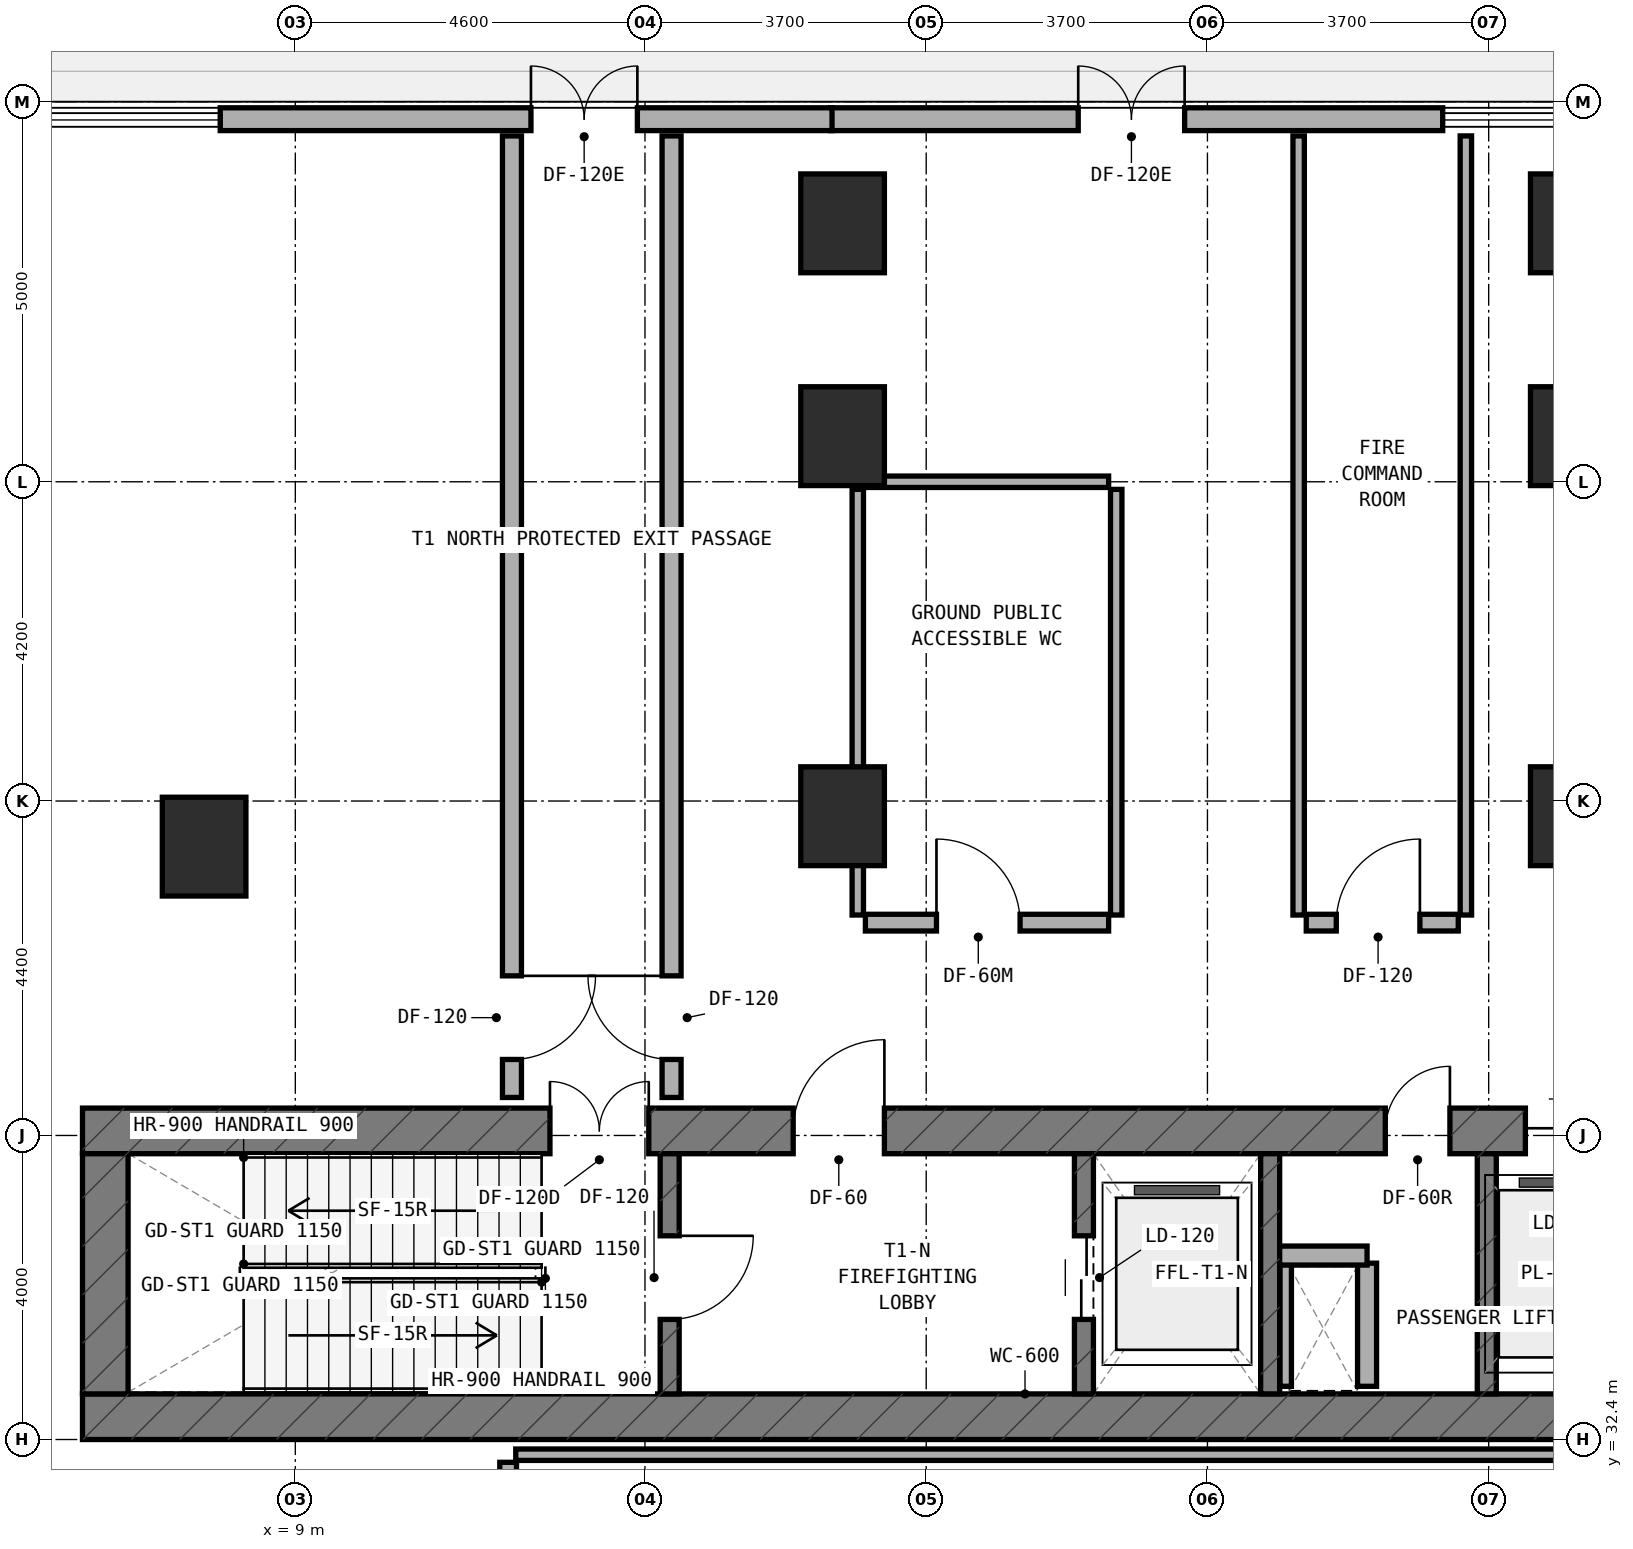
"""IFC4 building model, lengths in metres.
Left out: names, types, materials, properties, quantities, classifications, styles, units other than length and angle.
Written with IfcOpenShell. Run it as: python <this file> out.ifc"""

import sys

from ifc_helpers import new_model, si_unit, direction, frame, frame_2d, origin, origin_2d, place, context, subcontext, project, spatial, rectangle, extrude, element, fill, save


model = new_model("IFC4")
c1 = context("Model", 3, precision=1e-05, world=origin(), true_north=direction((0.0, 1.0)))
c2 = subcontext(c1, "Body", "Model", "MODEL_VIEW")
j1 = project(units=[si_unit("LENGTHUNIT", "METRE"), si_unit("PLANEANGLEUNIT", "RADIAN")], contexts=[c1])
p1 = place(None, origin())
s1 = spatial("IfcSite", under=j1, at=p1, CompositionType="ELEMENT")
p2 = place(p1, origin())
s2 = spatial("IfcBuilding", under=s1, at=p2, CompositionType="ELEMENT")
p3 = place(p2, origin())
s3 = spatial("IfcBuildingStorey", under=s2, at=p3, CompositionType="ELEMENT", Elevation=0.0)
p4 = place(p3, frame((6.2, 32.7, 0.0), z_axis=(0.0, 0.0, 1.0), x_axis=(1.0, 0.0, 0.0)))
e1 = element("IfcWall", 1, at=p4, inside=s3, PredefinedType="SHEAR", context=c2, shape_type="SweptSolid", body=[
    extrude(rectangle(XDim=24.8, YDim=0.6, at=frame_2d((12.4, 0.0))), origin(), (0.0, 0.0, 1.0), 5.4),
])
p5 = place(p3, frame((6.2, 36.46, 0.0), z_axis=(0.0, 0.0, 1.0), x_axis=(1.0, 0.0, 0.0)))
e2 = element("IfcWall", 2, at=p5, inside=s3, PredefinedType="SHEAR", context=c2, shape_type="SweptSolid", body=[
    extrude(rectangle(XDim=24.8, YDim=0.6, at=frame_2d((12.4, 0.0))), origin(), (0.0, 0.0, 1.0), 5.4),
])
p6 = place(p5, frame((9.35, 0.0, 0.0)))
e3 = element("IfcOpeningElement", 3, at=p6, cuts=e2, PredefinedType="OPENING", context=c2, shape_type="SweptSolid", body=[
    extrude(rectangle(XDim=1.2, YDim=2.15, at=frame_2d((0.6, 1.075))), frame((0.0, 0.31, 0.0), z_axis=(0.0, -1.0, 0.0), x_axis=(1.0, 0.0, 0.0)), (0.0, 0.0, 1.0), 0.62),
])
p7 = place(p5, frame((6.15, 0.0, 0.0)))
e4 = element("IfcOpeningElement", 4, at=p7, cuts=e2, PredefinedType="OPENING", context=c2, shape_type="SweptSolid", body=[
    extrude(rectangle(XDim=1.3, YDim=2.15, at=frame_2d((0.65, 1.075))), frame((0.0, 0.31, 0.0), z_axis=(0.0, -1.0, 0.0), x_axis=(1.0, 0.0, 0.0)), (0.0, 0.0, 1.0), 0.62),
])
p8 = place(p5, frame((17.14, 0.0, 0.0)))
e5 = element("IfcOpeningElement", 5, at=p8, cuts=e2, PredefinedType="OPENING", context=c2, shape_type="SweptSolid", body=[
    extrude(rectangle(XDim=0.85, YDim=2.1, at=frame_2d((0.425, 1.05))), frame((0.0, 0.31, 0.0), z_axis=(0.0, -1.0, 0.0), x_axis=(1.0, 0.0, 0.0)), (0.0, 0.0, 1.0), 0.62),
])
p9 = place(p5, frame((18.983, 0.0, 0.0)))
e6 = element("IfcOpeningElement", 6, at=p9, cuts=e2, PredefinedType="OPENING", context=c2, shape_type="SweptSolid", body=[
    extrude(rectangle(XDim=1.1, YDim=2.15, at=frame_2d((0.55, 1.075))), frame((0.0, 0.31, 0.0), z_axis=(0.0, -1.0, 0.0), x_axis=(1.0, 0.0, 0.0)), (0.0, 0.0, 1.0), 0.62),
])
p10 = place(p5, frame((20.85, 0.0, 0.0)))
e7 = element("IfcOpeningElement", 7, at=p10, cuts=e2, PredefinedType="OPENING", context=c2, shape_type="SweptSolid", body=[
    extrude(rectangle(XDim=1.1, YDim=2.15, at=frame_2d((0.55, 1.075))), frame((0.0, 0.31, 0.0), z_axis=(0.0, -1.0, 0.0), x_axis=(1.0, 0.0, 0.0)), (0.0, 0.0, 1.0), 0.62),
])
p11 = place(p5, frame((22.716, 0.0, 0.0)))
e8 = element("IfcOpeningElement", 8, at=p11, cuts=e2, PredefinedType="OPENING", context=c2, shape_type="SweptSolid", body=[
    extrude(rectangle(XDim=1.1, YDim=2.15, at=frame_2d((0.55, 1.075))), frame((0.0, 0.31, 0.0), z_axis=(0.0, -1.0, 0.0), x_axis=(1.0, 0.0, 0.0)), (0.0, 0.0, 1.0), 0.62),
])
p12 = place(p3, frame((6.5, 33.0, 0.0), z_axis=(0.0, 0.0, 1.0), x_axis=(0.0, 1.0, 0.0)))
e9 = element("IfcWall", 9, at=p12, inside=s3, PredefinedType="SHEAR", context=c2, shape_type="SweptSolid", body=[
    extrude(rectangle(XDim=3.16, YDim=0.6, at=frame_2d((1.58, 0.0))), origin(), (0.0, 0.0, 1.0), 5.4),
])
p13 = place(p3, frame((13.925, 33.0, 0.0), z_axis=(0.0, 0.0, 1.0), x_axis=(0.0, 1.0, 0.0)))
e10 = element("IfcWall", 10, at=p13, inside=s3, PredefinedType="STANDARD", context=c2, shape_type="SweptSolid", body=[
    extrude(rectangle(XDim=3.16, YDim=0.25, at=frame_2d((1.58, 0.0))), origin(), (0.0, 0.0, 1.0), 5.05),
])
p14 = place(p13, frame((0.98, 0.0, 0.0)))
e11 = element("IfcOpeningElement", 11, at=p14, cuts=e10, PredefinedType="OPENING", context=c2, shape_type="SweptSolid", body=[
    extrude(rectangle(XDim=1.1, YDim=2.15, at=frame_2d((0.55, 1.075))), frame((0.0, 0.135, 0.0), z_axis=(0.0, -1.0, 0.0), x_axis=(1.0, 0.0, 0.0)), (0.0, 0.0, 1.0), 0.27),
])
p15 = place(p3, frame((19.375, 33.0, 0.0), z_axis=(0.0, 0.0, 1.0), x_axis=(0.0, 1.0, 0.0)))
e12 = element("IfcWall", 12, at=p15, inside=s3, PredefinedType="STANDARD", context=c2, shape_type="SweptSolid", body=[
    extrude(rectangle(XDim=3.16, YDim=0.25, at=frame_2d((1.58, 0.0))), origin(), (0.0, 0.0, 1.0), 5.05),
])
p16 = place(p15, frame((0.98, 0.0, 0.0)))
e13 = element("IfcOpeningElement", 13, at=p16, cuts=e12, PredefinedType="OPENING", context=c2, shape_type="SweptSolid", body=[
    extrude(rectangle(XDim=1.1, YDim=2.15, at=frame_2d((0.55, 1.075))), frame((0.0, 0.135, 0.0), z_axis=(0.0, -1.0, 0.0), x_axis=(1.0, 0.0, 0.0)), (0.0, 0.0, 1.0), 0.27),
])
for number, where, z_axis, x_axis in (
    (14, (21.825, 33.0, 0.0), (0.0, 0.0, 1.0), (0.0, 1.0, 0.0)),
    (15, (24.675, 33.0, 0.0), (0.0, 0.0, 1.0), (0.0, 1.0, 0.0)),
):
    element("IfcWall", number, at=place(p3, frame(where, z_axis=z_axis, x_axis=x_axis)), inside=s3, PredefinedType="STANDARD", context=c2, shape_type="SweptSolid", body=[
        extrude(rectangle(XDim=3.16, YDim=0.25, at=frame_2d((1.58, 0.0))), origin(), (0.0, 0.0, 1.0), 5.05),
    ])
for number, where, z_axis, x_axis in (
    (16, (16.2, 40.6, 0.0), (0.0, 0.0, 1.0), (1.0, 0.0, 0.0)),
    (17, (25.8, 40.6, 0.0), (0.0, 0.0, 1.0), (1.0, 0.0, 0.0)),
    (18, (7.8, 40.2, 0.0), (0.0, 0.0, 1.0), (1.0, 0.0, 0.0)),
    (19, (16.2, 48.4, 0.0), (0.0, 0.0, 1.0), (1.0, 0.0, 0.0)),
    (20, (25.8, 48.4, 0.0), (0.0, 0.0, 1.0), (1.0, 0.0, 0.0)),
    (21, (16.2, 45.6, 0.0), (0.0, 0.0, 1.0), (1.0, 0.0, 0.0)),
    (22, (25.8, 45.6, 0.0), (0.0, 0.0, 1.0), (1.0, 0.0, 0.0)),
):
    element("IfcColumn", number, at=place(p3, frame(where, z_axis=z_axis, x_axis=x_axis)), inside=s3, PredefinedType="COLUMN", context=c2, shape_type="SweptSolid", body=[
        extrude(rectangle(XDim=1.1, YDim=1.3, at=origin_2d()), origin(), (0.0, 0.0, 1.0), 5.4),
    ])
p17 = place(p3, frame((24.095, 49.77, 0.0), z_axis=(0.0, 0.0, 1.0), x_axis=(-1.0, 0.0, 0.0)))
e23 = element("IfcWall", 23, at=p17, inside=s3, PredefinedType="STANDARD", context=c2, shape_type="SweptSolid", body=[
    extrude(rectangle(XDim=8.05, YDim=0.3, at=frame_2d((4.025, 0.0))), origin(), (0.0, 0.0, 1.0), 5.05),
])
p18 = place(p17, frame((3.395, 0.0, 0.0)))
e24 = element("IfcOpeningElement", 24, at=p18, cuts=e23, PredefinedType="OPENING", context=c2, shape_type="SweptSolid", body=[
    extrude(rectangle(XDim=1.4, YDim=2.2, at=frame_2d((0.7, 1.1))), frame((0.0, 0.16, 0.0), z_axis=(0.0, -1.0, 0.0), x_axis=(1.0, 0.0, 0.0)), (0.0, 0.0, 1.0), 0.32),
])
p19 = place(p3, frame((16.061, 49.77, 0.0), z_axis=(0.0, 0.0, 1.0), x_axis=(-1.0, 0.0, 0.0)))
e25 = element("IfcWall", 25, at=p19, inside=s3, PredefinedType="STANDARD", context=c2, shape_type="SweptSolid", body=[
    extrude(rectangle(XDim=8.049, YDim=0.3, at=frame_2d((4.024, 0.0))), origin(), (0.0, 0.0, 1.0), 5.05),
])
p20 = place(p19, frame((2.561, 0.0, 0.0)))
e26 = element("IfcOpeningElement", 26, at=p20, cuts=e25, PredefinedType="OPENING", context=c2, shape_type="SweptSolid", body=[
    extrude(rectangle(XDim=1.4, YDim=2.2, at=frame_2d((0.7, 1.1))), frame((0.0, 0.16, 0.0), z_axis=(0.0, -1.0, 0.0), x_axis=(1.0, 0.0, 0.0)), (0.0, 0.0, 1.0), 0.32),
])
p21 = place(p3, frame((22.03, 33.1, 0.0), z_axis=(0.0, 0.0, 1.0), x_axis=(0.0, 1.0, 0.0)))
e27 = element("IfcWall", 27, at=p21, inside=s3, PredefinedType="PARTITIONING", context=c2, shape_type="SweptSolid", body=[
    extrude(rectangle(XDim=1.62, YDim=0.15, at=frame_2d((0.81, 0.0))), origin(), (0.0, 0.0, 1.0), 5.05),
])
p22 = place(p3, frame((23.1, 33.1, 0.0), z_axis=(0.0, 0.0, 1.0), x_axis=(0.0, 1.0, 0.0)))
e28 = element("IfcWall", 28, at=p22, inside=s3, PredefinedType="SOLIDWALL", context=c2, shape_type="SweptSolid", body=[
    extrude(rectangle(XDim=1.62, YDim=0.25, at=frame_2d((0.81, 0.0))), origin(), (0.0, 0.0, 1.0), 5.05),
])
p23 = place(p3, frame((21.95, 34.82, 0.0), z_axis=(0.0, 0.0, 1.0), x_axis=(1.0, 0.0, 0.0)))
e29 = element("IfcWall", 29, at=p23, inside=s3, PredefinedType="SOLIDWALL", context=c2, shape_type="SweptSolid", body=[
    extrude(rectangle(XDim=1.15, YDim=0.25, at=frame_2d((0.575, 0.0))), origin(), (0.0, 0.0, 1.0), 5.05),
])
p24 = place(p3, frame((11.85, 36.9, 0.0), z_axis=(0.0, 0.0, 1.0), x_axis=(0.0, 1.0, 0.0)))
e30 = element("IfcWall", 30, at=p24, inside=s3, PredefinedType="SOLIDWALL", context=c2, shape_type="SweptSolid", body=[
    extrude(rectangle(XDim=12.65, YDim=0.25, at=frame_2d((6.325, 0.0))), origin(), (0.0, 0.0, 1.0), 4.225),
])
p25 = place(p24, frame((0.5, 0.0, 0.0)))
e31 = element("IfcOpeningElement", 31, at=p25, cuts=e30, PredefinedType="OPENING", context=c2, shape_type="SweptSolid", body=[
    extrude(rectangle(XDim=1.1, YDim=2.15, at=frame_2d((0.55, 1.075))), frame((0.0, 0.135, 0.0), z_axis=(0.0, -1.0, 0.0), x_axis=(1.0, 0.0, 0.0)), (0.0, 0.0, 1.0), 0.27),
])
p26 = place(p3, frame((13.95, 36.9, 0.0), z_axis=(0.0, 0.0, 1.0), x_axis=(0.0, 1.0, 0.0)))
e32 = element("IfcWall", 32, at=p26, inside=s3, PredefinedType="SOLIDWALL", context=c2, shape_type="SweptSolid", body=[
    extrude(rectangle(XDim=12.65, YDim=0.25, at=frame_2d((6.325, 0.0))), origin(), (0.0, 0.0, 1.0), 4.225),
])
p27 = place(p26, frame((0.5, 0.0, 0.0)))
e33 = element("IfcOpeningElement", 33, at=p27, cuts=e32, PredefinedType="OPENING", context=c2, shape_type="SweptSolid", body=[
    extrude(rectangle(XDim=1.1, YDim=2.15, at=frame_2d((0.55, 1.075))), frame((0.0, 0.135, 0.0), z_axis=(0.0, -1.0, 0.0), x_axis=(1.0, 0.0, 0.0)), (0.0, 0.0, 1.0), 0.27),
])
for number, where, z_axis, x_axis in (
    (34, (22.2, 39.3, 0.0), (0.0, 0.0, 1.0), (0.0, 1.0, 0.0)),
    (35, (24.4, 39.3, 0.0), (0.0, 0.0, 1.0), (0.0, 1.0, 0.0)),
):
    element("IfcWall", number, at=place(p3, frame(where, z_axis=z_axis, x_axis=x_axis)), inside=s3, PredefinedType="PARTITIONING", context=c2, shape_type="SweptSolid", body=[
        extrude(rectangle(XDim=10.25, YDim=0.15, at=frame_2d((5.125, 0.0))), origin(), (0.0, 0.0, 1.0), 4.425),
    ])
p28 = place(p3, frame((22.3, 39.2, 0.0), z_axis=(0.0, 0.0, 1.0), x_axis=(1.0, 0.0, 0.0)))
e36 = element("IfcWall", 36, at=p28, inside=s3, PredefinedType="SOLIDWALL", context=c2, shape_type="SweptSolid", body=[
    extrude(rectangle(XDim=2.0, YDim=0.22, at=frame_2d((1.0, 0.0))), origin(), (0.0, 0.0, 1.0), 5.05),
])
p29 = place(p28, frame((0.395, 0.0, 0.0)))
e37 = element("IfcOpeningElement", 37, at=p29, cuts=e36, PredefinedType="OPENING", context=c2, shape_type="SweptSolid", body=[
    extrude(rectangle(XDim=1.1, YDim=2.15, at=frame_2d((0.55, 1.075))), frame((0.0, 0.12, 0.0), z_axis=(0.0, -1.0, 0.0), x_axis=(1.0, 0.0, 0.0)), (0.0, 0.0, 1.0), 0.24),
])
p30 = place(p3, frame((11.9, 32.2, 0.0), z_axis=(0.0, 0.0, 1.0), x_axis=(1.0, 0.0, 0.0)))
e38 = element("IfcWall", 38, at=p30, inside=s3, PredefinedType="PARTITIONING", context=c2, shape_type="SweptSolid", body=[
    extrude(rectangle(XDim=17.0, YDim=0.15, at=frame_2d((8.5, 0.0))), origin(), (0.0, 0.0, 1.0), 5.05),
])
p31 = place(p3, frame((11.8, 17.9, 0.0), z_axis=(0.0, 0.0, 1.0), x_axis=(0.0, 1.0, 0.0)))
e39 = element("IfcWall", 39, at=p31, inside=s3, PredefinedType="SOLIDWALL", context=c2, shape_type="SweptSolid", body=[
    extrude(rectangle(XDim=14.2, YDim=0.22, at=frame_2d((7.1, 0.0))), origin(), (0.0, 0.0, 1.0), 4.125),
])
p32 = place(p31, frame((5.885, 0.0, 0.0)))
e40 = element("IfcOpeningElement", 40, at=p32, cuts=e39, PredefinedType="OPENING", context=c2, shape_type="SweptSolid", body=[
    extrude(rectangle(XDim=1.1, YDim=2.1, at=frame_2d((0.55, 1.05))), frame((0.0, 0.12, 0.0), z_axis=(0.0, -1.0, 0.0), x_axis=(1.0, 0.0, 0.0)), (0.0, 0.0, 1.0), 0.24),
])
p33 = place(p3, frame((16.4, 39.3, 0.0), z_axis=(0.0, 0.0, 1.0), x_axis=(0.0, 1.0, 0.0)))
e41 = element("IfcWall", 41, at=p33, inside=s3, PredefinedType="PARTITIONING", context=c2, shape_type="SweptSolid", body=[
    extrude(rectangle(XDim=5.6, YDim=0.15, at=frame_2d((2.8, 0.0))), origin(), (0.0, 0.0, 1.0), 4.525),
])
p34 = place(p3, frame((19.8, 39.3, 0.0), z_axis=(0.0, 0.0, 1.0), x_axis=(0.0, 1.0, 0.0)))
e42 = element("IfcWall", 42, at=p34, inside=s3, PredefinedType="PARTITIONING", context=c2, shape_type="SweptSolid", body=[
    extrude(rectangle(XDim=5.6, YDim=0.15, at=frame_2d((2.8, 0.0))), origin(), (0.0, 0.0, 1.0), 4.575),
])
p35 = place(p3, frame((16.5, 45.0, 0.0), z_axis=(0.0, 0.0, 1.0), x_axis=(1.0, 0.0, 0.0)))
e43 = element("IfcWall", 43, at=p35, inside=s3, PredefinedType="PARTITIONING", context=c2, shape_type="SweptSolid", body=[
    extrude(rectangle(XDim=3.2, YDim=0.15, at=frame_2d((1.6, 0.0))), origin(), (0.0, 0.0, 1.0), 5.05),
])
p36 = place(p3, frame((16.5, 39.2, 0.0), z_axis=(0.0, 0.0, 1.0), x_axis=(1.0, 0.0, 0.0)))
e44 = element("IfcWall", 44, at=p36, inside=s3, PredefinedType="SOLIDWALL", context=c2, shape_type="SweptSolid", body=[
    extrude(rectangle(XDim=3.2, YDim=0.22, at=frame_2d((1.6, 0.0))), origin(), (0.0, 0.0, 1.0), 5.05),
])
p37 = place(p36, frame((0.935, 0.0, 0.0)))
e45 = element("IfcOpeningElement", 45, at=p37, cuts=e44, PredefinedType="OPENING", context=c2, shape_type="SweptSolid", body=[
    extrude(rectangle(XDim=1.1, YDim=2.1, at=frame_2d((0.55, 1.05))), frame((0.0, 0.12, 0.0), z_axis=(0.0, -1.0, 0.0), x_axis=(1.0, 0.0, 0.0)), (0.0, 0.0, 1.0), 0.24),
])
p38 = place(p18, frame((1.4, 0.0, 0.0), z_axis=(0.0, 0.0, 1.0), x_axis=(-1.0, 0.0, 0.0)))
e46 = element("IfcDoor", 46, at=p38, inside=s3, OperationType="DOUBLE_DOOR_SINGLE_SWING", PredefinedType="DOOR", context=c2, shape_type="SweptSolid", body=[
    extrude(rectangle(XDim=1.4, YDim=2.2, at=frame_2d((0.7, 1.1))), frame((0.0, 0.025, 0.0), z_axis=(0.0, -1.0, 0.0), x_axis=(1.0, 0.0, 0.0)), (0.0, 0.0, 1.0), 0.05),
])
fill(e24, e46)
p39 = place(p20, frame((1.4, 0.0, 0.0), z_axis=(0.0, 0.0, 1.0), x_axis=(-1.0, 0.0, 0.0)))
e47 = element("IfcDoor", 47, at=p39, inside=s3, OperationType="DOUBLE_DOOR_SINGLE_SWING", PredefinedType="DOOR", context=c2, shape_type="SweptSolid", body=[
    extrude(rectangle(XDim=1.4, YDim=2.2, at=frame_2d((0.7, 1.1))), frame((0.0, 0.025, 0.0), z_axis=(0.0, -1.0, 0.0), x_axis=(1.0, 0.0, 0.0)), (0.0, 0.0, 1.0), 0.05),
])
fill(e26, e47)
p40 = place(p14, frame((1.1, 0.0, 0.0), z_axis=(0.0, 0.0, 1.0), x_axis=(-1.0, 0.0, 0.0)))
e48 = element("IfcDoor", 48, at=p40, inside=s3, OperationType="SINGLE_SWING_LEFT", PredefinedType="DOOR", context=c2, shape_type="SweptSolid", body=[
    extrude(rectangle(XDim=1.1, YDim=2.15, at=frame_2d((0.55, 1.075))), frame((0.0, 0.025, 0.0), z_axis=(0.0, -1.0, 0.0), x_axis=(1.0, 0.0, 0.0)), (0.0, 0.0, 1.0), 0.05),
])
fill(e11, e48)
p41 = place(p6, origin())
e49 = element("IfcDoor", 49, at=p41, inside=s3, OperationType="SINGLE_SWING_RIGHT", PredefinedType="DOOR", context=c2, shape_type="SweptSolid", body=[
    extrude(rectangle(XDim=1.2, YDim=2.15, at=frame_2d((0.6, 1.075))), frame((0.0, 0.025, 0.0), z_axis=(0.0, -1.0, 0.0), x_axis=(1.0, 0.0, 0.0)), (0.0, 0.0, 1.0), 0.05),
])
fill(e3, e49)
p42 = place(p7, origin())
e50 = element("IfcDoor", 50, at=p42, inside=s3, OperationType="DOUBLE_DOOR_SINGLE_SWING", PredefinedType="DOOR", context=c2, shape_type="SweptSolid", body=[
    extrude(rectangle(XDim=1.3, YDim=2.15, at=frame_2d((0.65, 1.075))), frame((0.0, 0.025, 0.0), z_axis=(0.0, -1.0, 0.0), x_axis=(1.0, 0.0, 0.0)), (0.0, 0.0, 1.0), 0.05),
])
fill(e4, e50)
p43 = place(p16, origin())
e51 = element("IfcDoor", 51, at=p43, inside=s3, OperationType="DOUBLE_DOOR_SLIDING", PredefinedType="DOOR", context=c2, shape_type="SweptSolid", body=[
    extrude(rectangle(XDim=1.1, YDim=2.15, at=frame_2d((0.55, 1.075))), frame((0.0, 0.025, 0.0), z_axis=(0.0, -1.0, 0.0), x_axis=(1.0, 0.0, 0.0)), (0.0, 0.0, 1.0), 0.05),
])
fill(e13, e51)
p44 = place(p8, origin())
e52 = element("IfcDoor", 52, at=p44, inside=s3, OperationType="SINGLE_SWING_RIGHT", PredefinedType="DOOR", context=c2, shape_type="SweptSolid", body=[
    extrude(rectangle(XDim=0.85, YDim=2.1, at=frame_2d((0.425, 1.05))), frame((0.0, 0.025, 0.0), z_axis=(0.0, -1.0, 0.0), x_axis=(1.0, 0.0, 0.0)), (0.0, 0.0, 1.0), 0.05),
])
fill(e5, e52)
p45 = place(p9, origin())
e53 = element("IfcDoor", 53, at=p45, inside=s3, OperationType="DOUBLE_DOOR_SLIDING", PredefinedType="DOOR", context=c2, shape_type="SweptSolid", body=[
    extrude(rectangle(XDim=1.1, YDim=2.15, at=frame_2d((0.55, 1.075))), frame((0.0, 0.025, 0.0), z_axis=(0.0, -1.0, 0.0), x_axis=(1.0, 0.0, 0.0)), (0.0, 0.0, 1.0), 0.05),
])
fill(e6, e53)
p46 = place(p25, frame((1.1, 0.0, 0.0), z_axis=(0.0, 0.0, 1.0), x_axis=(-1.0, 0.0, 0.0)))
e54 = element("IfcDoor", 54, at=p46, inside=s3, OperationType="SINGLE_SWING_LEFT", PredefinedType="DOOR", context=c2, shape_type="SweptSolid", body=[
    extrude(rectangle(XDim=1.1, YDim=2.15, at=frame_2d((0.55, 1.075))), frame((0.0, 0.025, 0.0), z_axis=(0.0, -1.0, 0.0), x_axis=(1.0, 0.0, 0.0)), (0.0, 0.0, 1.0), 0.05),
])
fill(e31, e54)
p47 = place(p27, origin())
e55 = element("IfcDoor", 55, at=p47, inside=s3, OperationType="SINGLE_SWING_RIGHT", PredefinedType="DOOR", context=c2, shape_type="SweptSolid", body=[
    extrude(rectangle(XDim=1.1, YDim=2.15, at=frame_2d((0.55, 1.075))), frame((0.0, 0.025, 0.0), z_axis=(0.0, -1.0, 0.0), x_axis=(1.0, 0.0, 0.0)), (0.0, 0.0, 1.0), 0.05),
])
fill(e33, e55)
p48 = place(p29, origin())
e56 = element("IfcDoor", 56, at=p48, inside=s3, OperationType="SINGLE_SWING_RIGHT", PredefinedType="DOOR", context=c2, shape_type="SweptSolid", body=[
    extrude(rectangle(XDim=1.1, YDim=2.15, at=frame_2d((0.55, 1.075))), frame((0.0, 0.025, 0.0), z_axis=(0.0, -1.0, 0.0), x_axis=(1.0, 0.0, 0.0)), (0.0, 0.0, 1.0), 0.05),
])
fill(e37, e56)
p49 = place(p37, origin())
e57 = element("IfcDoor", 57, at=p49, inside=s3, OperationType="SINGLE_SWING_LEFT", PredefinedType="DOOR", context=c2, shape_type="SweptSolid", body=[
    extrude(rectangle(XDim=1.1, YDim=2.1, at=frame_2d((0.55, 1.05))), frame((0.0, 0.025, 0.0), z_axis=(0.0, -1.0, 0.0), x_axis=(1.0, 0.0, 0.0)), (0.0, 0.0, 1.0), 0.05),
])
fill(e45, e57)
save(model, sys.argv[1])
